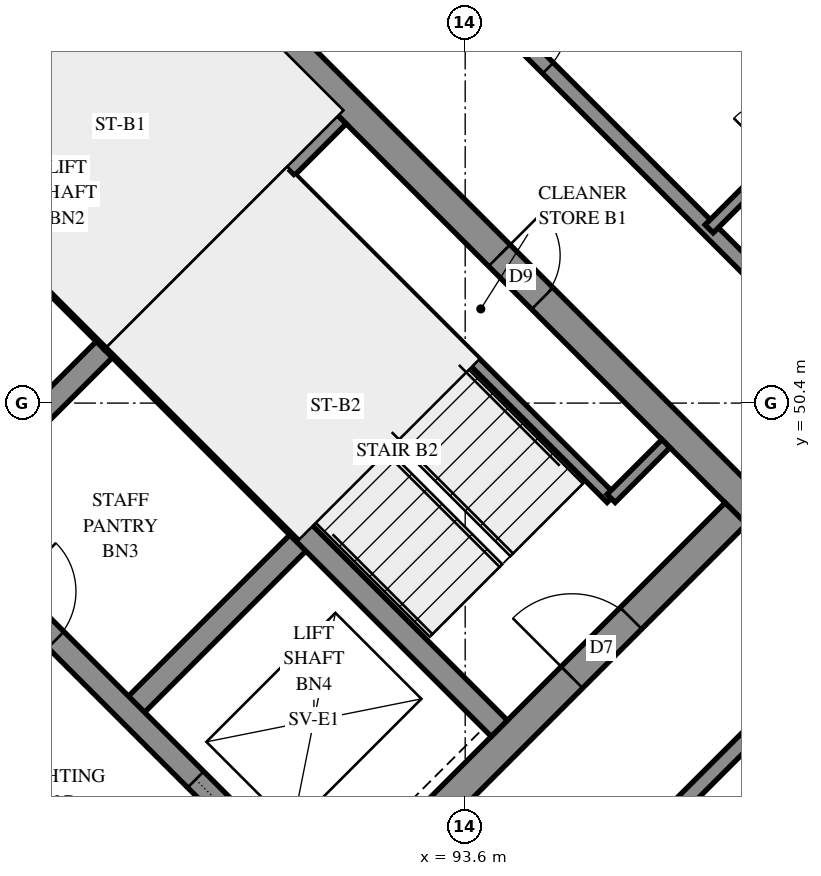
"""IFC4 building model, lengths in metres.
Left out: names, types, materials, properties, quantities, classifications, styles, units other than length and angle.
Written with IfcOpenShell. Run it as: python <this file> out.ifc"""

import sys

from ifc_helpers import new_model, si_unit, direction, frame, frame_2d, origin, place, context, subcontext, project, spatial, polyline, rectangle, outline, extrude, element, fill, save


model = new_model("IFC4")
c1 = context("Model", 3, precision=1e-05, world=origin(), true_north=direction((0.0, 1.0)))
c2 = subcontext(c1, "Body", "Model", "MODEL_VIEW")
j1 = project(units=[si_unit("LENGTHUNIT", "METRE"), si_unit("PLANEANGLEUNIT", "RADIAN")], contexts=[c1])
p1 = place(None, origin())
s1 = spatial("IfcSite", under=j1, at=p1, CompositionType="ELEMENT")
p2 = place(p1, origin())
s2 = spatial("IfcBuilding", under=s1, at=p2, CompositionType="ELEMENT")
p3 = place(p2, frame((0.0, 0.0, 264.2)))
s3 = spatial("IfcBuildingStorey", under=s2, at=p3, CompositionType="ELEMENT", Elevation=264.2)
p4 = place(p3, frame((86.695, 59.696, -0.3), z_axis=(0.0, 0.0, 1.0), x_axis=(0.7071100706, -0.7071034917, 0.0)))
e1 = element("IfcWall", 1, at=p4, inside=s3, PredefinedType="SHEAR", context=c2, shape_type="SweptSolid", body=[
    extrude(rectangle(XDim=15.2, YDim=0.4, at=frame_2d((7.6, 0.0))), origin(), (0.0, 0.0, 1.0), 2.7),
])
p5 = place(p4, frame((10.4, 0.0, 0.3)))
e2 = element("IfcOpeningElement", 2, at=p5, cuts=e1, PredefinedType="OPENING", context=c2, shape_type="SweptSolid", body=[
    extrude(rectangle(XDim=0.8, YDim=2.1, at=frame_2d((0.4, 1.05))), frame((0.0, 0.21, 0.0), z_axis=(0.0, -1.0, 0.0), x_axis=(1.0, 0.0, 0.0)), (0.0, 0.0, 1.0), 0.42),
])
p6 = place(p3, frame((86.978, 38.766, -0.3), z_axis=(0.0, 0.0, 1.0), x_axis=(0.7071067812, 0.7071067812, 0.0)))
e3 = element("IfcWall", 3, at=p6, inside=s3, PredefinedType="SHEAR", context=c2, shape_type="SweptSolid", body=[
    extrude(rectangle(XDim=14.4, YDim=0.4, at=frame_2d((7.2, 0.0))), origin(), (0.0, 0.0, 1.0), 2.7),
])
p7 = place(p6, frame((4.55, 0.0, 0.3)))
e4 = element("IfcOpeningElement", 4, at=p7, cuts=e3, PredefinedType="OPENING", context=c2, shape_type="SweptSolid", body=[
    extrude(rectangle(XDim=1.1, YDim=2.1, at=frame_2d((0.55, 1.05))), frame((0.0, 0.21, 0.0), z_axis=(0.0, -1.0, 0.0), x_axis=(1.0, 0.0, 0.0)), (0.0, 0.0, 1.0), 0.42),
])
p8 = place(p6, frame((11.35, 0.0, 0.3)))
e5 = element("IfcOpeningElement", 5, at=p8, cuts=e3, PredefinedType="OPENING", context=c2, shape_type="SweptSolid", body=[
    extrude(rectangle(XDim=1.1, YDim=2.1, at=frame_2d((0.55, 1.05))), frame((0.0, 0.21, 0.0), z_axis=(0.0, -1.0, 0.0), x_axis=(1.0, 0.0, 0.0)), (0.0, 0.0, 1.0), 0.42),
])
for number, where, z_axis, x_axis in (
    (6, (86.625, 48.878, 0.0), (0.0, 0.0, 1.0), (0.707, 0.707, 0.0)),
    (7, (89.17, 46.332, 0.0), (0.0, 0.0, 1.0), (0.707, 0.707, 0.0)),
):
    element("IfcWall", number, at=place(p3, frame(where, z_axis=z_axis, x_axis=x_axis)), inside=s3, PredefinedType="SOLIDWALL", context=c2, shape_type="SweptSolid", body=[
        extrude(rectangle(XDim=3.3, YDim=0.3, at=frame_2d((1.65, 0.0))), origin(), (0.0, 0.0, 1.0), 3.1),
    ])
p9 = place(p3, frame((78.988, 51.423, 0.0), z_axis=(0.0, 0.0, 1.0), x_axis=(0.7071067812, -0.7071067812, 0.0)))
e8 = element("IfcWall", 8, at=p9, inside=s3, PredefinedType="SOLIDWALL", context=c2, shape_type="SweptSolid", body=[
    extrude(rectangle(XDim=14.4, YDim=0.3, at=frame_2d((7.2, 0.0))), origin(), (0.0, 0.0, 1.0), 3.1),
])
p10 = place(p9, frame((1.35, 0.0, 0.0)))
e9 = element("IfcOpeningElement", 9, at=p10, cuts=e8, PredefinedType="OPENING", context=c2, shape_type="SweptSolid", body=[
    extrude(rectangle(XDim=0.9, YDim=2.1, at=frame_2d((0.45, 1.05))), frame((0.0, 0.16, 0.0), z_axis=(0.0, -1.0, 0.0), x_axis=(1.0, 0.0, 0.0)), (0.0, 0.0, 1.0), 0.32),
])
p11 = place(p9, frame((4.95, 0.0, 0.0)))
e10 = element("IfcOpeningElement", 10, at=p11, cuts=e8, PredefinedType="OPENING", context=c2, shape_type="SweptSolid", body=[
    extrude(rectangle(XDim=0.9, YDim=2.1, at=frame_2d((0.45, 1.05))), frame((0.0, 0.16, 0.0), z_axis=(0.0, -1.0, 0.0), x_axis=(1.0, 0.0, 0.0)), (0.0, 0.0, 1.0), 0.32),
])
p12 = place(p9, frame((8.55, 0.0, 0.0)))
e11 = element("IfcOpeningElement", 11, at=p12, cuts=e8, PredefinedType="OPENING", context=c2, shape_type="SweptSolid", body=[
    extrude(rectangle(XDim=0.9, YDim=2.1, at=frame_2d((0.45, 1.05))), frame((0.0, 0.16, 0.0), z_axis=(0.0, -1.0, 0.0), x_axis=(1.0, 0.0, 0.0)), (0.0, 0.0, 1.0), 0.32),
])
p13 = place(p9, frame((12.05, 0.0, 0.0)))
e12 = element("IfcOpeningElement", 12, at=p13, cuts=e8, PredefinedType="OPENING", context=c2, shape_type="SweptSolid", body=[
    extrude(rectangle(XDim=1.1, YDim=2.1, at=frame_2d((0.55, 1.05))), frame((0.0, 0.16, 0.0), z_axis=(0.0, -1.0, 0.0), x_axis=(1.0, 0.0, 0.0)), (0.0, 0.0, 1.0), 0.32),
])
p14 = place(p3, frame((81.534, 53.969, 0.0), z_axis=(0.0, 0.0, 1.0), x_axis=(0.707103309, -0.7071102534, 0.0)))
e13 = element("IfcWall", 13, at=p14, inside=s3, PredefinedType="SOLIDWALL", context=c2, shape_type="SweptSolid", body=[
    extrude(rectangle(XDim=14.4, YDim=0.3, at=frame_2d((7.2, 0.0))), origin(), (0.0, 0.0, 1.0), 3.1),
])
p15 = place(p14, frame((8.55, 0.0, 0.0)))
e14 = element("IfcOpeningElement", 14, at=p15, cuts=e13, PredefinedType="OPENING", context=c2, shape_type="SweptSolid", body=[
    extrude(rectangle(XDim=0.9, YDim=2.1, at=frame_2d((0.45, 1.05))), frame((0.0, 0.16, 0.0), z_axis=(0.0, -1.0, 0.0), x_axis=(1.0, 0.0, 0.0)), (0.0, 0.0, 1.0), 0.32),
])
p16 = place(p14, frame((1.25, 0.0, 0.0)))
e15 = element("IfcOpeningElement", 15, at=p16, cuts=e13, PredefinedType="OPENING", context=c2, shape_type="SweptSolid", body=[
    extrude(rectangle(XDim=1.1, YDim=2.1, at=frame_2d((0.55, 1.05))), frame((0.0, 0.16, 0.0), z_axis=(0.0, -1.0, 0.0), x_axis=(1.0, 0.0, 0.0)), (0.0, 0.0, 1.0), 0.32),
])
p17 = place(p14, frame((4.85, 0.0, 0.0)))
e16 = element("IfcOpeningElement", 16, at=p17, cuts=e13, PredefinedType="OPENING", context=c2, shape_type="SweptSolid", body=[
    extrude(rectangle(XDim=1.1, YDim=2.1, at=frame_2d((0.55, 1.05))), frame((0.0, 0.16, 0.0), z_axis=(0.0, -1.0, 0.0), x_axis=(1.0, 0.0, 0.0)), (0.0, 0.0, 1.0), 0.32),
])
p18 = place(p14, frame((12.05, 0.0, 0.0)))
e17 = element("IfcOpeningElement", 17, at=p18, cuts=e13, PredefinedType="OPENING", context=c2, shape_type="SweptSolid", body=[
    extrude(rectangle(XDim=1.1, YDim=2.1, at=frame_2d((0.55, 1.05))), frame((0.0, 0.16, 0.0), z_axis=(0.0, -1.0, 0.0), x_axis=(1.0, 0.0, 0.0)), (0.0, 0.0, 1.0), 0.32),
])
for number, where, z_axis, x_axis in (
    (18, (83.867, 56.302, 0.0), (0.0, 0.0, 1.0), (0.707, -0.707, 0.0)),
    (19, (88.958, 51.211, 0.0), (0.0, 0.0, 1.0), (0.707, -0.707, 0.0)),
):
    element("IfcWall", number, at=place(p3, frame(where, z_axis=z_axis, x_axis=x_axis)), inside=s3, PredefinedType="SOLIDWALL", context=c2, shape_type="SweptSolid", body=[
        extrude(rectangle(XDim=7.2, YDim=0.3, at=frame_2d((3.6, 0.0))), origin(), (0.0, 0.0, 1.0), 3.1),
    ])
p19 = place(p3, frame((88.958, 51.211, 0.0), z_axis=(0.0, 0.0, 1.0), x_axis=(0.7071067812, 0.7071067812, 0.0)))
e20 = element("IfcWall", 20, at=p19, inside=s3, PredefinedType="SOLIDWALL", context=c2, shape_type="SweptSolid", body=[
    extrude(rectangle(XDim=4.2, YDim=0.3, at=frame_2d((2.1, 0.0))), origin(), (0.0, 0.0, 1.0), 3.1),
])
p20 = place(p3, frame((98.423, 54.834, 0.0), z_axis=(0.0, 0.0, 1.0), x_axis=(-0.8009997286, 0.5986647099, 0.0)))
e21 = element("IfcWall", 21, at=p20, inside=s3, PredefinedType="SOLIDWALL", context=c2, shape_type="SweptSolid", body=[
    extrude(outline(polyline([(-0.033, -0.225), (3.337, -0.225), (3.402, 0.225), (0.033, 0.225), (-0.033, -0.225)])), origin(), (0.0, 0.0, 1.0), 3.1),
])
p21 = place(p20, frame((1.253, 0.0, 0.45)))
e22 = element("IfcOpeningElement", 22, at=p21, cuts=e21, PredefinedType="OPENING", context=c2, shape_type="SweptSolid", body=[
    extrude(rectangle(XDim=1.2, YDim=2.55, at=frame_2d((0.6, 1.275))), frame((0.0, 0.235, 0.0), z_axis=(0.0, -1.0, 0.0), x_axis=(1.0, 0.0, 0.0)), (0.0, 0.0, 1.0), 0.47),
])
p22 = place(p3, frame((91.313, 53.354, 0.0), z_axis=(0.0, 0.0, 1.0), x_axis=(0.7071067812, -0.7071067812, 0.0)))
e23 = element("IfcWall", 23, at=p22, inside=s3, PredefinedType="PARTITIONING", context=c2, shape_type="SweptSolid", body=[
    extrude(rectangle(XDim=5.95, YDim=0.15, at=frame_2d((2.975, 0.0))), origin(), (0.0, 0.0, 1.0), 3.1),
])
p23 = place(p3, frame((95.52, 49.146, 0.0), z_axis=(0.0, 0.0, 1.0), x_axis=(0.7071067812, 0.7071067812, 0.0)))
e24 = element("IfcWall", 24, at=p23, inside=s3, PredefinedType="PARTITIONING", context=c2, shape_type="SweptSolid", body=[
    extrude(rectangle(XDim=1.02, YDim=0.15, at=frame_2d((0.51, 0.0))), origin(), (0.0, 0.0, 1.0), 3.1),
])
p24 = place(p3, frame((93.907, 42.585, 0.0), z_axis=(0.0, 0.0, 1.0), x_axis=(0.7071067812, 0.7071067812, 0.0)))
e25 = element("IfcWall", 25, at=p24, inside=s3, PredefinedType="PARTITIONING", context=c2, shape_type="SweptSolid", body=[
    extrude(rectangle(XDim=9.201, YDim=0.2, at=frame_2d((4.601, 0.0))), origin(), (0.0, 0.0, 1.0), 3.1),
])
p25 = place(p24, frame((0.193, 0.0, 0.0)))
e26 = element("IfcOpeningElement", 26, at=p25, cuts=e25, PredefinedType="OPENING", context=c2, shape_type="SweptSolid", body=[
    extrude(rectangle(XDim=1.0, YDim=2.1, at=frame_2d((0.5, 1.05))), frame((0.0, 0.11, 0.0), z_axis=(0.0, -1.0, 0.0), x_axis=(1.0, 0.0, 0.0)), (0.0, 0.0, 1.0), 0.22),
])
p26 = place(p3, frame((94.755, 41.737, 0.0), z_axis=(0.0, 0.0, 1.0), x_axis=(0.7071146549, 0.7070989073, 0.0)))
e27 = element("IfcWall", 27, at=p26, inside=s3, PredefinedType="PARTITIONING", context=c2, shape_type="SweptSolid", body=[
    extrude(rectangle(XDim=6.35, YDim=0.2, at=frame_2d((3.175, 0.0))), origin(), (0.0, 0.0, 1.0), 3.1),
])
p27 = place(p3, frame((93.621, 55.875, 0.0), z_axis=(0.0, 0.0, 1.0), x_axis=(0.7071623255, -0.7070512325, 0.0)))
e28 = element("IfcWall", 28, at=p27, inside=s3, PredefinedType="PARTITIONING", context=c2, shape_type="SweptSolid", body=[
    extrude(rectangle(XDim=5.401, YDim=0.2, at=frame_2d((2.7, 0.0))), origin(), (0.0, 0.0, 1.0), 3.1),
])
p28 = place(p27, frame((0.611, 0.0, 0.0)))
e29 = element("IfcOpeningElement", 29, at=p28, cuts=e28, PredefinedType="OPENING", context=c2, shape_type="SweptSolid", body=[
    extrude(rectangle(XDim=0.9, YDim=2.1, at=frame_2d((0.45, 1.05))), frame((0.0, 0.11, 0.0), z_axis=(0.0, -1.0, 0.0), x_axis=(1.0, 0.0, 0.0)), (0.0, 0.0, 1.0), 0.22),
])
p29 = place(p3, frame((96.809, 52.693, 0.0), z_axis=(0.0, 0.0, 1.0), x_axis=(0.7075279036, 0.7066854079, 0.0)))
e30 = element("IfcWall", 30, at=p29, inside=s3, PredefinedType="PARTITIONING", context=c2, shape_type="SweptSolid", body=[
    extrude(rectangle(XDim=2.374, YDim=0.15, at=frame_2d((1.187, 0.0))), origin(), (0.0, 0.0, 1.0), 3.1),
])
p30 = place(p29, frame((1.258, 0.0, 0.0)))
e31 = element("IfcOpeningElement", 31, at=p30, cuts=e30, PredefinedType="OPENING", context=c2, shape_type="SweptSolid", body=[
    extrude(rectangle(XDim=0.8, YDim=2.1, at=frame_2d((0.4, 1.05))), frame((0.0, 0.085, 0.0), z_axis=(0.0, -1.0, 0.0), x_axis=(1.0, 0.0, 0.0)), (0.0, 0.0, 1.0), 0.17),
])
p31 = place(p5, origin())
e32 = element("IfcDoor", 32, at=p31, inside=s3, OperationType="SINGLE_SWING_RIGHT", PredefinedType="DOOR", context=c2, shape_type="SweptSolid", body=[
    extrude(rectangle(XDim=0.8, YDim=2.1, at=frame_2d((0.4, 1.05))), frame((0.0, 0.025, 0.0), z_axis=(0.0, -1.0, 0.0), x_axis=(1.0, 0.0, 0.0)), (0.0, 0.0, 1.0), 0.05),
])
fill(e2, e32)
p32 = place(p8, origin())
e33 = element("IfcDoor", 33, at=p32, inside=s3, OperationType="SINGLE_SWING_RIGHT", PredefinedType="DOOR", context=c2, shape_type="SweptSolid", body=[
    extrude(rectangle(XDim=1.1, YDim=2.1, at=frame_2d((0.55, 1.05))), frame((0.0, 0.025, 0.0), z_axis=(0.0, -1.0, 0.0), x_axis=(1.0, 0.0, 0.0)), (0.0, 0.0, 1.0), 0.05),
])
fill(e5, e33)
p33 = place(p15, origin())
e34 = element("IfcDoor", 34, at=p33, inside=s3, OperationType="SINGLE_SWING_LEFT", PredefinedType="DOOR", context=c2, shape_type="SweptSolid", body=[
    extrude(rectangle(XDim=0.9, YDim=2.1, at=frame_2d((0.45, 1.05))), frame((0.0, 0.025, 0.0), z_axis=(0.0, -1.0, 0.0), x_axis=(1.0, 0.0, 0.0)), (0.0, 0.0, 1.0), 0.05),
])
fill(e14, e34)
p34 = place(p18, origin())
e35 = element("IfcDoor", 35, at=p34, inside=s3, OperationType="SLIDING_TO_RIGHT", PredefinedType="DOOR", context=c2, shape_type="SweptSolid", body=[
    extrude(rectangle(XDim=1.1, YDim=2.1, at=frame_2d((0.55, 1.05))), frame((0.0, 0.025, 0.0), z_axis=(0.0, -1.0, 0.0), x_axis=(1.0, 0.0, 0.0)), (0.0, 0.0, 1.0), 0.05),
])
fill(e17, e35)
p35 = place(p28, origin())
e36 = element("IfcDoor", 36, at=p35, inside=s3, OperationType="SINGLE_SWING_LEFT", PredefinedType="DOOR", context=c2, shape_type="SweptSolid", body=[
    extrude(rectangle(XDim=0.9, YDim=2.1, at=frame_2d((0.45, 1.05))), frame((0.0, 0.025, 0.0), z_axis=(0.0, -1.0, 0.0), x_axis=(1.0, 0.0, 0.0)), (0.0, 0.0, 1.0), 0.05),
])
fill(e29, e36)
save(model, sys.argv[1])
